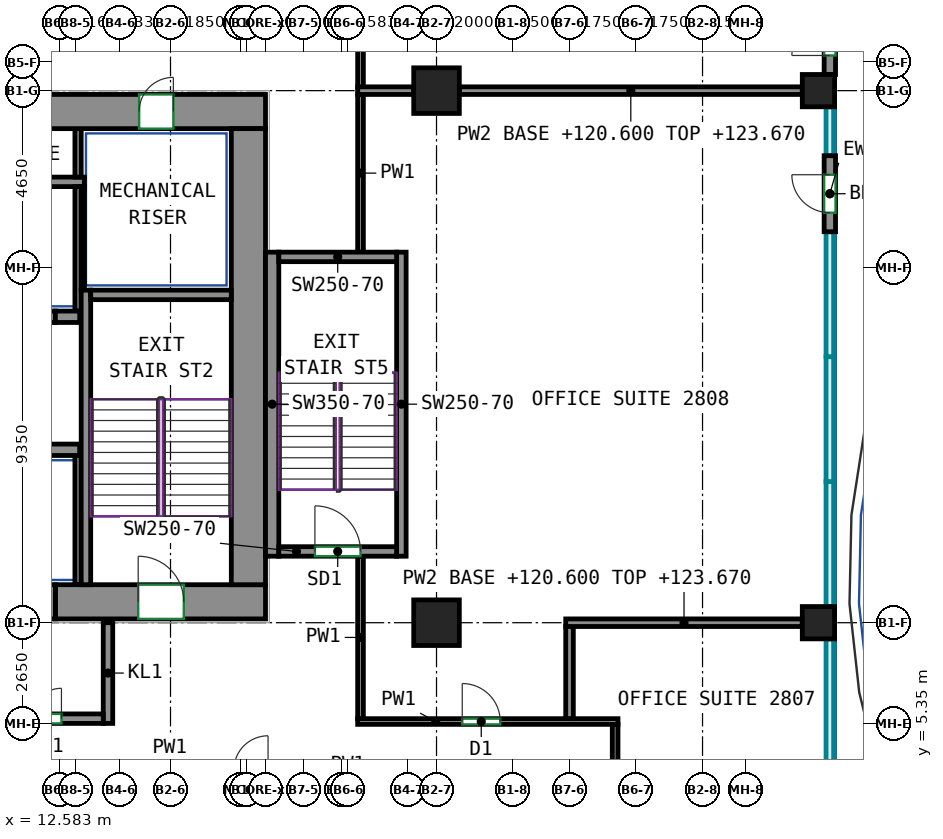
"""IFC4 building model, lengths in metres.
Left out: names, types, materials, properties, quantities, classifications, styles, units other than length and angle.
Written with IfcOpenShell. Run it as: python <this file> out.ifc"""

import sys

from ifc_helpers import new_model, si_unit, direction, frame, frame_2d, origin, origin_2d, place, context, subcontext, project, spatial, rectangle, extrude, source, transform, mapped, element, fill, save


model = new_model("IFC4")
c1 = context("Model", 3, precision=1e-05, world=origin(), true_north=direction((0.0, 1.0)))
c2 = subcontext(c1, "Body", "Model", "MODEL_VIEW")
j1 = project(units=[si_unit("LENGTHUNIT", "METRE"), si_unit("PLANEANGLEUNIT", "RADIAN")], contexts=[c1])
p1 = place(None, origin())
s1 = spatial("IfcSite", under=j1, at=p1, CompositionType="ELEMENT")
p2 = place(p1, origin())
s2 = spatial("IfcBuilding", under=s1, at=p2, CompositionType="ELEMENT")
p3 = place(p2, frame((0.0, 0.0, 120.6)))
s3 = spatial("IfcBuildingStorey", under=s2, at=p3, CompositionType="ELEMENT", Elevation=120.6)
m1 = source(origin(), c2, "Body", "SweptSolid", [
    extrude(rectangle(XDim=1.2, YDim=1.2, at=origin_2d()), origin(), (0.0, 0.0, 1.0), 3.72),
])
for number, where, z_axis, x_axis in (
    (1, (22.5, 8.0, 0.0), (0.0, 0.0, 1.0), (1.0, 0.0, 0.0)),
    (2, (22.5, 22.0, 0.0), (0.0, 0.0, 1.0), (1.0, 0.0, 0.0)),
):
    element("IfcColumn", number, at=place(p3, frame(where, z_axis=z_axis, x_axis=x_axis)), inside=s3, PredefinedType="COLUMN", context=c2, shape_type="MappedRepresentation", body=[
        mapped(m1, transform((0.0, 0.0, 0.0))),
    ])
m2 = source(origin(), c2, "Body", "SweptSolid", [
    extrude(rectangle(XDim=0.85, YDim=0.85, at=origin_2d()), origin(), (0.0, 0.0, 1.0), 3.72),
])
for number, where, z_axis, x_axis in (
    (3, (32.55, 8.0, 0.0), (0.0, 0.0, 1.0), (1.0, 0.0, 0.0)),
    (4, (32.55, 22.0, 0.0), (0.0, 0.0, 1.0), (1.0, 0.0, 0.0)),
):
    element("IfcColumn", number, at=place(p3, frame(where, z_axis=z_axis, x_axis=x_axis)), inside=s3, PredefinedType="COLUMN", context=c2, shape_type="MappedRepresentation", body=[
        mapped(m2, transform((0.0, 0.0, 0.0))),
    ])
m3 = source(origin(), c2, "Body", "SweptSolid", [
    extrude(rectangle(XDim=5.53, YDim=0.9, at=frame_2d((2.765, 0.0))), origin(), (0.0, 0.0, 1.0), 3.72),
])
p4 = place(p3, frame((12.47, 8.55, 0.0), z_axis=(0.0, 0.0, 1.0), x_axis=(1.0, 0.0, 0.0)))
e5 = element("IfcWall", 5, at=p4, inside=s3, PredefinedType="SHEAR", context=c2, shape_type="MappedRepresentation", body=[
    mapped(m3, transform((0.0, 0.0, 0.0))),
])
p5 = place(p4, frame((2.18, 0.0, 0.0)))
e6 = element("IfcOpeningElement", 6, at=p5, cuts=e5, PredefinedType="OPENING", context=c2, shape_type="SweptSolid", body=[
    extrude(rectangle(XDim=1.2, YDim=2.1, at=frame_2d((0.6, 1.05))), frame((0.0, 0.46, 0.0), z_axis=(0.0, -1.0, 0.0), x_axis=(1.0, 0.0, 0.0)), (0.0, 0.0, 1.0), 0.92),
])
m4 = source(origin(), c2, "Body", "SweptSolid", [
    extrude(rectangle(XDim=33.9, YDim=0.9, at=frame_2d((16.95, 0.0))), origin(), (0.0, 0.0, 1.0), 3.72),
])
p6 = place(p3, frame((-15.9, 21.45, 0.0), z_axis=(0.0, 0.0, 1.0), x_axis=(1.0, 0.0, 0.0)))
e7 = element("IfcWall", 7, at=p6, inside=s3, PredefinedType="SHEAR", context=c2, shape_type="MappedRepresentation", body=[
    mapped(m4, transform((0.0, 0.0, 0.0))),
])
p7 = place(p6, frame((7.12, 0.0, 0.0)))
e8 = element("IfcOpeningElement", 8, at=p7, cuts=e7, PredefinedType="OPENING", context=c2, shape_type="SweptSolid", body=[
    extrude(rectangle(XDim=0.9, YDim=2.1, at=frame_2d((0.45, 1.05))), frame((0.0, 0.46, 0.0), z_axis=(0.0, -1.0, 0.0), x_axis=(1.0, 0.0, 0.0)), (0.0, 0.0, 1.0), 0.92),
])
p8 = place(p6, frame((12.427, 0.0, 0.0)))
e9 = element("IfcOpeningElement", 9, at=p8, cuts=e7, PredefinedType="OPENING", context=c2, shape_type="SweptSolid", body=[
    extrude(rectangle(XDim=0.9, YDim=2.1, at=frame_2d((0.45, 1.05))), frame((0.0, 0.46, 0.0), z_axis=(0.0, -1.0, 0.0), x_axis=(1.0, 0.0, 0.0)), (0.0, 0.0, 1.0), 0.92),
])
p9 = place(p6, frame((17.465, 0.0, 0.0)))
e10 = element("IfcOpeningElement", 10, at=p9, cuts=e7, PredefinedType="OPENING", context=c2, shape_type="SweptSolid", body=[
    extrude(rectangle(XDim=0.9, YDim=2.1, at=frame_2d((0.45, 1.05))), frame((0.0, 0.46, 0.0), z_axis=(0.0, -1.0, 0.0), x_axis=(1.0, 0.0, 0.0)), (0.0, 0.0, 1.0), 0.92),
])
p10 = place(p6, frame((21.686, 0.0, 0.0)))
e11 = element("IfcOpeningElement", 11, at=p10, cuts=e7, PredefinedType="OPENING", context=c2, shape_type="SweptSolid", body=[
    extrude(rectangle(XDim=0.9, YDim=2.1, at=frame_2d((0.45, 1.05))), frame((0.0, 0.46, 0.0), z_axis=(0.0, -1.0, 0.0), x_axis=(1.0, 0.0, 0.0)), (0.0, 0.0, 1.0), 0.92),
])
p11 = place(p6, frame((26.027, 0.0, 0.0)))
e12 = element("IfcOpeningElement", 12, at=p11, cuts=e7, PredefinedType="OPENING", context=c2, shape_type="SweptSolid", body=[
    extrude(rectangle(XDim=0.9, YDim=2.1, at=frame_2d((0.45, 1.05))), frame((0.0, 0.46, 0.0), z_axis=(0.0, -1.0, 0.0), x_axis=(1.0, 0.0, 0.0)), (0.0, 0.0, 1.0), 0.92),
])
p12 = place(p6, frame((2.425, 0.0, 0.0)))
e13 = element("IfcOpeningElement", 13, at=p12, cuts=e7, PredefinedType="OPENING", context=c2, shape_type="SweptSolid", body=[
    extrude(rectangle(XDim=0.9, YDim=2.1, at=frame_2d((0.45, 1.05))), frame((0.0, 0.46, 0.0), z_axis=(0.0, -1.0, 0.0), x_axis=(1.0, 0.0, 0.0)), (0.0, 0.0, 1.0), 0.92),
])
p13 = place(p6, frame((30.575, 0.0, 0.0)))
e14 = element("IfcOpeningElement", 14, at=p13, cuts=e7, PredefinedType="OPENING", context=c2, shape_type="SweptSolid", body=[
    extrude(rectangle(XDim=0.9, YDim=2.1, at=frame_2d((0.45, 1.05))), frame((0.0, 0.46, 0.0), z_axis=(0.0, -1.0, 0.0), x_axis=(1.0, 0.0, 0.0)), (0.0, 0.0, 1.0), 0.92),
])
m5 = source(origin(), c2, "Body", "SweptSolid", [
    extrude(rectangle(XDim=12.0, YDim=0.9, at=frame_2d((6.0, 0.0))), origin(), (0.0, 0.0, 1.0), 3.72),
])
p14 = place(p3, frame((17.55, 9.0, 0.0), z_axis=(0.0, 0.0, 1.0), x_axis=(0.0, 1.0, 0.0)))
e15 = element("IfcWall", 15, at=p14, inside=s3, PredefinedType="SHEAR", context=c2, shape_type="MappedRepresentation", body=[
    mapped(m5, transform((0.0, 0.0, 0.0))),
])
m6 = source(origin(), c2, "Body", "SweptSolid", [
    extrude(rectangle(XDim=7.75, YDim=0.25, at=frame_2d((3.875, 0.0))), origin(), (0.0, 0.0, 1.0), 3.72),
])
p15 = place(p3, frame((13.275, 9.0, 0.0), z_axis=(0.0, 0.0, 1.0), x_axis=(0.0, 1.0, 0.0)))
e16 = element("IfcWall", 16, at=p15, inside=s3, PredefinedType="SHEAR", context=c2, shape_type="MappedRepresentation", body=[
    mapped(m6, transform((0.0, 0.0, 0.0))),
])
m7 = source(origin(), c2, "Body", "SweptSolid", [
    extrude(rectangle(XDim=3.7, YDim=0.25, at=frame_2d((1.85, 0.0))), origin(), (0.0, 0.0, 1.0), 3.72),
])
p16 = place(p3, frame((13.4, 16.625, 0.0), z_axis=(0.0, 0.0, 1.0), x_axis=(1.0, 0.0, 0.0)))
e17 = element("IfcWall", 17, at=p16, inside=s3, PredefinedType="SHEAR", context=c2, shape_type="MappedRepresentation", body=[
    mapped(m7, transform((0.0, 0.0, 0.0))),
])
m8 = source(origin(), c2, "Body", "SweptSolid", [
    extrude(rectangle(XDim=8.0, YDim=0.35, at=frame_2d((4.0, 0.0))), origin(), (0.0, 0.0, 1.0), 3.72),
])
p17 = place(p3, frame((18.175, 9.75, 0.0), z_axis=(0.0, 0.0, 1.0), x_axis=(0.0, 1.0, 0.0)))
e18 = element("IfcWall", 18, at=p17, inside=s3, PredefinedType="SHEAR", context=c2, shape_type="MappedRepresentation", body=[
    mapped(m8, transform((0.0, 0.0, 0.0))),
])
m9 = source(origin(), c2, "Body", "SweptSolid", [
    extrude(rectangle(XDim=8.0, YDim=0.25, at=frame_2d((4.0, 0.0))), origin(), (0.0, 0.0, 1.0), 3.72),
])
p18 = place(p3, frame((21.575, 9.75, 0.0), z_axis=(0.0, 0.0, 1.0), x_axis=(0.0, 1.0, 0.0)))
e19 = element("IfcWall", 19, at=p18, inside=s3, PredefinedType="SHEAR", context=c2, shape_type="MappedRepresentation", body=[
    mapped(m9, transform((0.0, 0.0, 0.0))),
])
m10 = source(origin(), c2, "Body", "SweptSolid", [
    extrude(rectangle(XDim=3.1, YDim=0.25, at=frame_2d((1.55, 0.0))), origin(), (0.0, 0.0, 1.0), 3.72),
])
p19 = place(p3, frame((18.35, 9.875, 0.0), z_axis=(0.0, 0.0, 1.0), x_axis=(1.0, 0.0, 0.0)))
e20 = element("IfcWall", 20, at=p19, inside=s3, PredefinedType="SHEAR", context=c2, shape_type="MappedRepresentation", body=[
    mapped(m10, transform((0.0, 0.0, 0.0))),
])
p20 = place(p19, frame((0.95, 0.0, 0.0)))
e21 = element("IfcOpeningElement", 21, at=p20, cuts=e20, PredefinedType="OPENING", context=c2, shape_type="SweptSolid", body=[
    extrude(rectangle(XDim=1.2, YDim=2.1, at=frame_2d((0.6, 1.05))), frame((0.0, 0.135, 0.0), z_axis=(0.0, -1.0, 0.0), x_axis=(1.0, 0.0, 0.0)), (0.0, 0.0, 1.0), 0.27),
])
p21 = place(p3, frame((18.35, 17.625, 0.0), z_axis=(0.0, 0.0, 1.0), x_axis=(1.0, 0.0, 0.0)))
e22 = element("IfcWall", 22, at=p21, inside=s3, PredefinedType="SHEAR", context=c2, shape_type="MappedRepresentation", body=[
    mapped(m10, transform((0.0, 0.0, 0.0))),
])
m11 = source(origin(), c2, "Body", "SweptSolid", [
    extrude(rectangle(XDim=2.82, YDim=0.3, at=frame_2d((1.41, 0.0))), origin(), (0.0, 0.0, 1.0), 3.72),
])
p22 = place(p3, frame((10.29, 12.55, 0.0), z_axis=(0.0, 0.0, 1.0), x_axis=(1.0, 0.0, 0.0)))
e23 = element("IfcWall", 23, at=p22, inside=s3, PredefinedType="SHEAR", context=c2, shape_type="MappedRepresentation", body=[
    mapped(m11, transform((0.0, 0.0, 0.0))),
])
m12 = source(origin(), c2, "Body", "SweptSolid", [
    extrude(rectangle(XDim=0.64, YDim=0.3, at=frame_2d((0.32, 0.0))), origin(), (0.0, 0.0, 1.0), 3.72),
])
p23 = place(p3, frame((12.47, 16.05, 0.0), z_axis=(0.0, 0.0, 1.0), x_axis=(1.0, 0.0, 0.0)))
e24 = element("IfcWall", 24, at=p23, inside=s3, PredefinedType="SHEAR", context=c2, shape_type="MappedRepresentation", body=[
    mapped(m12, transform((0.0, 0.0, 0.0))),
])
m13 = source(origin(), c2, "Body", "SweptSolid", [
    extrude(rectangle(XDim=2.0, YDim=0.3, at=frame_2d((1.0, 0.0))), origin(), (0.0, 0.0, 1.0), 3.72),
])
p24 = place(p3, frame((32.85, 18.288, 0.0), z_axis=(0.0, 0.0, 1.0), x_axis=(0.0, 1.0, 0.0)))
e25 = element("IfcWall", 25, at=p24, inside=s3, PredefinedType="SOLIDWALL", context=c2, shape_type="MappedRepresentation", body=[
    mapped(m13, transform((0.0, 0.0, 0.0))),
])
p25 = place(p24, frame((0.5, 0.0, 0.0)))
e26 = element("IfcOpeningElement", 26, at=p25, cuts=e25, PredefinedType="OPENING", context=c2, shape_type="SweptSolid", body=[
    extrude(rectangle(XDim=1.0, YDim=2.1, at=frame_2d((0.5, 1.05))), frame((0.0, 0.16, 0.0), z_axis=(0.0, -1.0, 0.0), x_axis=(1.0, 0.0, 0.0)), (0.0, 0.0, 1.0), 0.32),
])
p26 = place(p3, frame((32.85, 22.425, 0.0), z_axis=(0.0, 0.0, 1.0), x_axis=(0.0, 1.0, 0.0)))
e27 = element("IfcWall", 27, at=p26, inside=s3, PredefinedType="SOLIDWALL", context=c2, shape_type="MappedRepresentation", body=[
    mapped(m13, transform((0.0, 0.0, 0.0))),
])
p27 = place(p26, frame((0.5, 0.0, 0.0)))
e28 = element("IfcOpeningElement", 28, at=p27, cuts=e27, PredefinedType="OPENING", context=c2, shape_type="SweptSolid", body=[
    extrude(rectangle(XDim=1.0, YDim=2.1, at=frame_2d((0.5, 1.05))), frame((0.0, 0.16, 0.0), z_axis=(0.0, -1.0, 0.0), x_axis=(1.0, 0.0, 0.0)), (0.0, 0.0, 1.0), 0.32),
])
m14 = source(origin(), c2, "Body", "SweptSolid", [
    extrude(rectangle(XDim=1.4, YDim=0.3, at=frame_2d((0.7, 0.0))), origin(), (0.0, 0.0, 1.0), 3.72),
])
p28 = place(p3, frame((11.07, 16.05, 0.0), z_axis=(0.0, 0.0, 1.0), x_axis=(1.0, 0.0, 0.0)))
e29 = element("IfcWall", 29, at=p28, inside=s3, PredefinedType="PARTITIONING", context=c2, shape_type="MappedRepresentation", body=[
    mapped(m14, transform((0.0, 0.0, 0.0))),
])
p29 = place(p28, frame((0.15, 0.0, 0.0)))
e30 = element("IfcOpeningElement", 30, at=p29, cuts=e29, PredefinedType="OPENING", context=c2, shape_type="SweptSolid", body=[
    extrude(rectangle(XDim=1.1, YDim=2.1, at=frame_2d((0.55, 1.05))), frame((0.0, 0.16, 0.0), z_axis=(0.0, -1.0, 0.0), x_axis=(1.0, 0.0, 0.0)), (0.0, 0.0, 1.0), 0.32),
])
m15 = source(origin(), c2, "Body", "SweptSolid", [
    extrude(rectangle(XDim=2.65, YDim=0.25, at=frame_2d((1.325, 0.0))), origin(), (0.0, 0.0, 1.0), 3.72),
])
p30 = place(p3, frame((13.855, 5.35, 0.0), z_axis=(0.0, 0.0, 1.0), x_axis=(0.0, 1.0, 0.0)))
e31 = element("IfcWall", 31, at=p30, inside=s3, PredefinedType="PARTITIONING", context=c2, shape_type="MappedRepresentation", body=[
    mapped(m15, transform((0.0, 0.0, 0.0))),
])
m16 = source(origin(), c2, "Body", "SweptSolid", [
    extrude(rectangle(XDim=3.0, YDim=0.25, at=frame_2d((1.5, 0.0))), origin(), (0.0, 0.0, 1.0), 3.72),
])
p31 = place(p3, frame((10.73, 5.475, 0.0), z_axis=(0.0, 0.0, 1.0), x_axis=(1.0, 0.0, 0.0)))
e32 = element("IfcWall", 32, at=p31, inside=s3, PredefinedType="PARTITIONING", context=c2, shape_type="MappedRepresentation", body=[
    mapped(m16, transform((0.0, 0.0, 0.0))),
])
p32 = place(p31, frame((1.1, 0.0, 0.0)))
e33 = element("IfcOpeningElement", 33, at=p32, cuts=e32, PredefinedType="OPENING", context=c2, shape_type="SweptSolid", body=[
    extrude(rectangle(XDim=0.8, YDim=2.0, at=frame_2d((0.4, 1.0))), frame((0.0, 0.135, 0.0), z_axis=(0.0, -1.0, 0.0), x_axis=(1.0, 0.0, 0.0)), (0.0, 0.0, 1.0), 0.27),
])
m17 = source(origin(), c2, "Body", "SweptSolid", [
    extrude(rectangle(XDim=19.01, YDim=0.25, at=frame_2d((9.505, 0.0))), origin(), (0.0, 0.0, 1.0), 3.72),
])
p33 = place(p3, frame((-5.775, 19.6, 0.0), z_axis=(0.0, 0.0, 1.0), x_axis=(1.0, 0.0, 0.0)))
e34 = element("IfcWall", 34, at=p33, inside=s3, PredefinedType="PARTITIONING", context=c2, shape_type="MappedRepresentation", body=[
    mapped(m17, transform((0.0, 0.0, 0.0))),
])
m18 = source(origin(), c2, "Body", "SweptSolid", [
    extrude(rectangle(XDim=3.275, YDim=0.165, at=frame_2d((1.638, 0.0))), origin(), (0.0, 0.0, 1.0), 3.72),
])
p34 = place(p3, frame((13.067, 16.2, 0.0), z_axis=(0.0, 0.0, 1.0), x_axis=(0.0, 1.0, 0.0)))
e35 = element("IfcWall", 35, at=p34, inside=s3, PredefinedType="PARTITIONING", context=c2, shape_type="MappedRepresentation", body=[
    mapped(m18, transform((0.0, 0.0, 0.0))),
])
m19 = source(origin(), c2, "Body", "SweptSolid", [
    extrude(rectangle(XDim=1.275, YDim=0.165, at=frame_2d((0.637, 0.0))), origin(), (0.0, 0.0, 1.0), 3.72),
])
p35 = place(p3, frame((13.067, 19.725, 0.0), z_axis=(0.0, 0.0, 1.0), x_axis=(0.0, 1.0, 0.0)))
e36 = element("IfcWall", 36, at=p35, inside=s3, PredefinedType="PARTITIONING", context=c2, shape_type="MappedRepresentation", body=[
    mapped(m19, transform((0.0, 0.0, 0.0))),
])
m20 = source(origin(), c2, "Body", "SweptSolid", [
    extrude(rectangle(XDim=2.725, YDim=0.085, at=frame_2d((1.363, 0.0))), origin(), (0.0, 0.0, 1.0), 3.72),
])
p36 = place(p3, frame((13.192, 16.75, 0.0), z_axis=(0.0, 0.0, 1.0), x_axis=(0.0, 1.0, 0.0)))
e37 = element("IfcWall", 37, at=p36, inside=s3, PredefinedType="PARTITIONING", context=c2, shape_type="MappedRepresentation", body=[
    mapped(m20, transform((0.0, 0.0, 0.0))),
])
m21 = source(origin(), c2, "Body", "SweptSolid", [
    extrude(rectangle(XDim=3.4, YDim=0.165, at=frame_2d((1.7, 0.0))), origin(), (0.0, 0.0, 1.0), 3.72),
])
p37 = place(p3, frame((13.067, 9.0, 0.0), z_axis=(0.0, 0.0, 1.0), x_axis=(0.0, 1.0, 0.0)))
e38 = element("IfcWall", 38, at=p37, inside=s3, PredefinedType="PARTITIONING", context=c2, shape_type="MappedRepresentation", body=[
    mapped(m21, transform((0.0, 0.0, 0.0))),
])
m22 = source(origin(), c2, "Body", "SweptSolid", [
    extrude(rectangle(XDim=1.4, YDim=0.9, at=frame_2d((0.7, 0.0))), origin(), (0.0, 0.0, 1.0), 2.7),
])
p38 = place(p3, frame((11.07, 8.55, 0.0), z_axis=(0.0, 0.0, 1.0), x_axis=(1.0, 0.0, 0.0)))
e39 = element("IfcWall", 39, at=p38, inside=s3, PredefinedType="PARTITIONING", context=c2, shape_type="MappedRepresentation", body=[
    mapped(m22, transform((0.0, 0.0, 0.0))),
])
p39 = place(p38, frame((0.25, 0.0, 0.0)))
e40 = element("IfcOpeningElement", 40, at=p39, cuts=e39, PredefinedType="OPENING", context=c2, shape_type="SweptSolid", body=[
    extrude(rectangle(XDim=0.9, YDim=2.1, at=frame_2d((0.45, 1.05))), frame((0.0, 0.46, 0.0), z_axis=(0.0, -1.0, 0.0), x_axis=(1.0, 0.0, 0.0)), (0.0, 0.0, 1.0), 0.92),
])
p40 = place(p3, frame((27.2, -3.535, 0.0), z_axis=(0.0, 0.0, 1.0), x_axis=(0.0, 1.0, 0.0)))
e41 = element("IfcWall", 41, at=p40, inside=s3, PredefinedType="PARTITIONING", context=c2, shape_type="SweptSolid", body=[
    extrude(rectangle(XDim=8.86, YDim=0.15, at=frame_2d((4.43, 0.0))), origin(), (0.0, 0.0, 1.0), 3.72),
])
p41 = place(p40, frame((6.854, 0.0, 0.0)))
e42 = element("IfcOpeningElement", 42, at=p41, cuts=e41, PredefinedType="OPENING", context=c2, shape_type="SweptSolid", body=[
    extrude(rectangle(XDim=1.0, YDim=2.1, at=frame_2d((0.5, 1.05))), frame((0.0, 0.085, 0.0), z_axis=(0.0, -1.0, 0.0), x_axis=(1.0, 0.0, 0.0)), (0.0, 0.0, 1.0), 0.17),
])
p42 = place(p3, frame((20.5, 17.75, 0.0), z_axis=(0.0, 0.0, 1.0), x_axis=(0.0, 1.0, 0.0)))
e43 = element("IfcWall", 43, at=p42, inside=s3, PredefinedType="PARTITIONING", context=c2, shape_type="SweptSolid", body=[
    extrude(rectangle(XDim=4.16, YDim=0.15, at=frame_2d((2.08, 0.0))), origin(), (0.0, 0.0, 1.0), 3.72),
])
p43 = place(p3, frame((20.5, 5.475, 0.0), z_axis=(0.0, 0.0, 1.0), x_axis=(0.0, 1.0, 0.0)))
e44 = element("IfcWall", 44, at=p43, inside=s3, PredefinedType="PARTITIONING", context=c2, shape_type="SweptSolid", body=[
    extrude(rectangle(XDim=4.275, YDim=0.15, at=frame_2d((2.137, 0.0))), origin(), (0.0, 0.0, 1.0), 3.72),
])
p44 = place(p3, frame((20.425, 5.4, 0.0), z_axis=(0.0, 0.0, 1.0), x_axis=(1.0, 0.0, 0.0)))
e45 = element("IfcWall", 45, at=p44, inside=s3, PredefinedType="PARTITIONING", context=c2, shape_type="SweptSolid", body=[
    extrude(rectangle(XDim=6.85, YDim=0.15, at=frame_2d((3.425, 0.0))), origin(), (0.0, 0.0, 1.0), 3.72),
])
p45 = place(p44, frame((2.752, 0.0, 0.0)))
e46 = element("IfcOpeningElement", 46, at=p45, cuts=e45, PredefinedType="OPENING", context=c2, shape_type="SweptSolid", body=[
    extrude(rectangle(XDim=1.0, YDim=2.1, at=frame_2d((0.5, 1.05))), frame((0.0, 0.085, 0.0), z_axis=(0.0, -1.0, 0.0), x_axis=(1.0, 0.0, 0.0)), (0.0, 0.0, 1.0), 0.17),
])
p46 = place(p3, frame((20.5, 22.09, 0.0), z_axis=(0.0, 0.0, 1.0), x_axis=(0.0, 1.0, 0.0)))
e47 = element("IfcWall", 47, at=p46, inside=s3, PredefinedType="PARTITIONING", context=c2, shape_type="SweptSolid", body=[
    extrude(rectangle(XDim=3.035, YDim=0.15, at=frame_2d((1.518, 0.0))), origin(), (0.0, 0.0, 1.0), 3.72),
])
p47 = place(p3, frame((26.0, 5.476, 0.0), z_axis=(0.0, 0.0, 1.0), x_axis=(0.0, 1.0, 0.0)))
e48 = element("IfcWall", 48, at=p47, inside=s3, PredefinedType="PARTITIONING", context=c2, shape_type="SweptSolid", body=[
    extrude(rectangle(XDim=2.424, YDim=0.2, at=frame_2d((1.212, 0.0))), origin(), (0.0, 0.0, 1.0), 3.72),
])
p48 = place(p3, frame((25.9, 8.0, 0.0), z_axis=(0.0, 0.0, 1.0), x_axis=(1.0, 0.0, 0.0)))
e49 = element("IfcWall", 49, at=p48, inside=s3, PredefinedType="PARTITIONING", context=c2, shape_type="SweptSolid", body=[
    extrude(rectangle(XDim=6.225, YDim=0.2, at=frame_2d((3.113, 0.0))), origin(), (0.0, 0.0, 1.0), 3.07),
])
p49 = place(p3, frame((20.426, 22.0, 0.0), z_axis=(0.0, 0.0, 1.0), x_axis=(1.0, 0.0, 0.0)))
e50 = element("IfcWall", 50, at=p49, inside=s3, PredefinedType="PARTITIONING", context=c2, shape_type="SweptSolid", body=[
    extrude(rectangle(XDim=1.474, YDim=0.2, at=frame_2d((0.737, 0.0))), origin(), (0.0, 0.0, 1.0), 3.72),
])
p50 = place(p3, frame((23.1, 22.0, 0.0), z_axis=(0.0, 0.0, 1.0), x_axis=(1.0, 0.0, 0.0)))
e51 = element("IfcWall", 51, at=p50, inside=s3, PredefinedType="PARTITIONING", context=c2, shape_type="SweptSolid", body=[
    extrude(rectangle(XDim=9.025, YDim=0.2, at=frame_2d((4.512, 0.0))), origin(), (0.0, 0.0, 1.0), 3.07),
])
p51 = place(p25, origin())
e52 = element("IfcDoor", 52, at=p51, inside=s3, OperationType="SINGLE_SWING_RIGHT", PredefinedType="DOOR", context=c2, shape_type="SweptSolid", body=[
    extrude(rectangle(XDim=1.0, YDim=2.1, at=frame_2d((0.5, 1.05))), frame((0.0, 0.025, 0.0), z_axis=(0.0, -1.0, 0.0), x_axis=(1.0, 0.0, 0.0)), (0.0, 0.0, 1.0), 0.05),
])
fill(e26, e52)
p52 = place(p27, origin())
e53 = element("IfcDoor", 53, at=p52, inside=s3, OperationType="SINGLE_SWING_LEFT", PredefinedType="DOOR", context=c2, shape_type="SweptSolid", body=[
    extrude(rectangle(XDim=1.0, YDim=2.1, at=frame_2d((0.5, 1.05))), frame((0.0, 0.025, 0.0), z_axis=(0.0, -1.0, 0.0), x_axis=(1.0, 0.0, 0.0)), (0.0, 0.0, 1.0), 0.05),
])
fill(e28, e53)
p53 = place(p32, origin())
e54 = element("IfcDoor", 54, at=p53, inside=s3, OperationType="SINGLE_SWING_RIGHT", PredefinedType="DOOR", context=c2, shape_type="SweptSolid", body=[
    extrude(rectangle(XDim=0.8, YDim=2.0, at=frame_2d((0.4, 1.0))), frame((0.0, 0.025, 0.0), z_axis=(0.0, -1.0, 0.0), x_axis=(1.0, 0.0, 0.0)), (0.0, 0.0, 1.0), 0.05),
])
fill(e33, e54)
p54 = place(p13, origin())
e55 = element("IfcDoor", 55, at=p54, inside=s3, OperationType="SINGLE_SWING_RIGHT", PredefinedType="DOOR", context=c2, shape_type="SweptSolid", body=[
    extrude(rectangle(XDim=0.9, YDim=2.1, at=frame_2d((0.45, 1.05))), frame((0.0, -0.305, 0.0), z_axis=(0.0, -1.0, 0.0), x_axis=(1.0, 0.0, 0.0)), (0.0, 0.0, 1.0), 0.05),
])
fill(e14, e55)
p55 = place(p5, origin())
e56 = element("IfcDoor", 56, at=p55, inside=s3, OperationType="DOUBLE_DOOR_SINGLE_SWING", PredefinedType="DOOR", context=c2, shape_type="SweptSolid", body=[
    extrude(rectangle(XDim=1.2, YDim=2.1, at=frame_2d((0.6, 1.05))), frame((0.0, 0.355, 0.0), z_axis=(0.0, -1.0, 0.0), x_axis=(1.0, 0.0, 0.0)), (0.0, 0.0, 1.0), 0.05),
])
fill(e6, e56)
p56 = place(p20, origin())
e57 = element("IfcDoor", 57, at=p56, inside=s3, OperationType="DOUBLE_DOOR_SINGLE_SWING", PredefinedType="DOOR", context=c2, shape_type="SweptSolid", body=[
    extrude(rectangle(XDim=1.2, YDim=2.1, at=frame_2d((0.6, 1.05))), frame((0.0, 0.025, 0.0), z_axis=(0.0, -1.0, 0.0), x_axis=(1.0, 0.0, 0.0)), (0.0, 0.0, 1.0), 0.05),
])
fill(e21, e57)
p57 = place(p45, origin())
e58 = element("IfcDoor", 58, at=p57, inside=s3, OperationType="SINGLE_SWING_LEFT", PredefinedType="DOOR", context=c2, shape_type="SweptSolid", body=[
    extrude(rectangle(XDim=1.0, YDim=2.1, at=frame_2d((0.5, 1.05))), frame((0.0, 0.025, 0.0), z_axis=(0.0, -1.0, 0.0), x_axis=(1.0, 0.0, 0.0)), (0.0, 0.0, 1.0), 0.05),
])
fill(e46, e58)
save(model, sys.argv[1])
